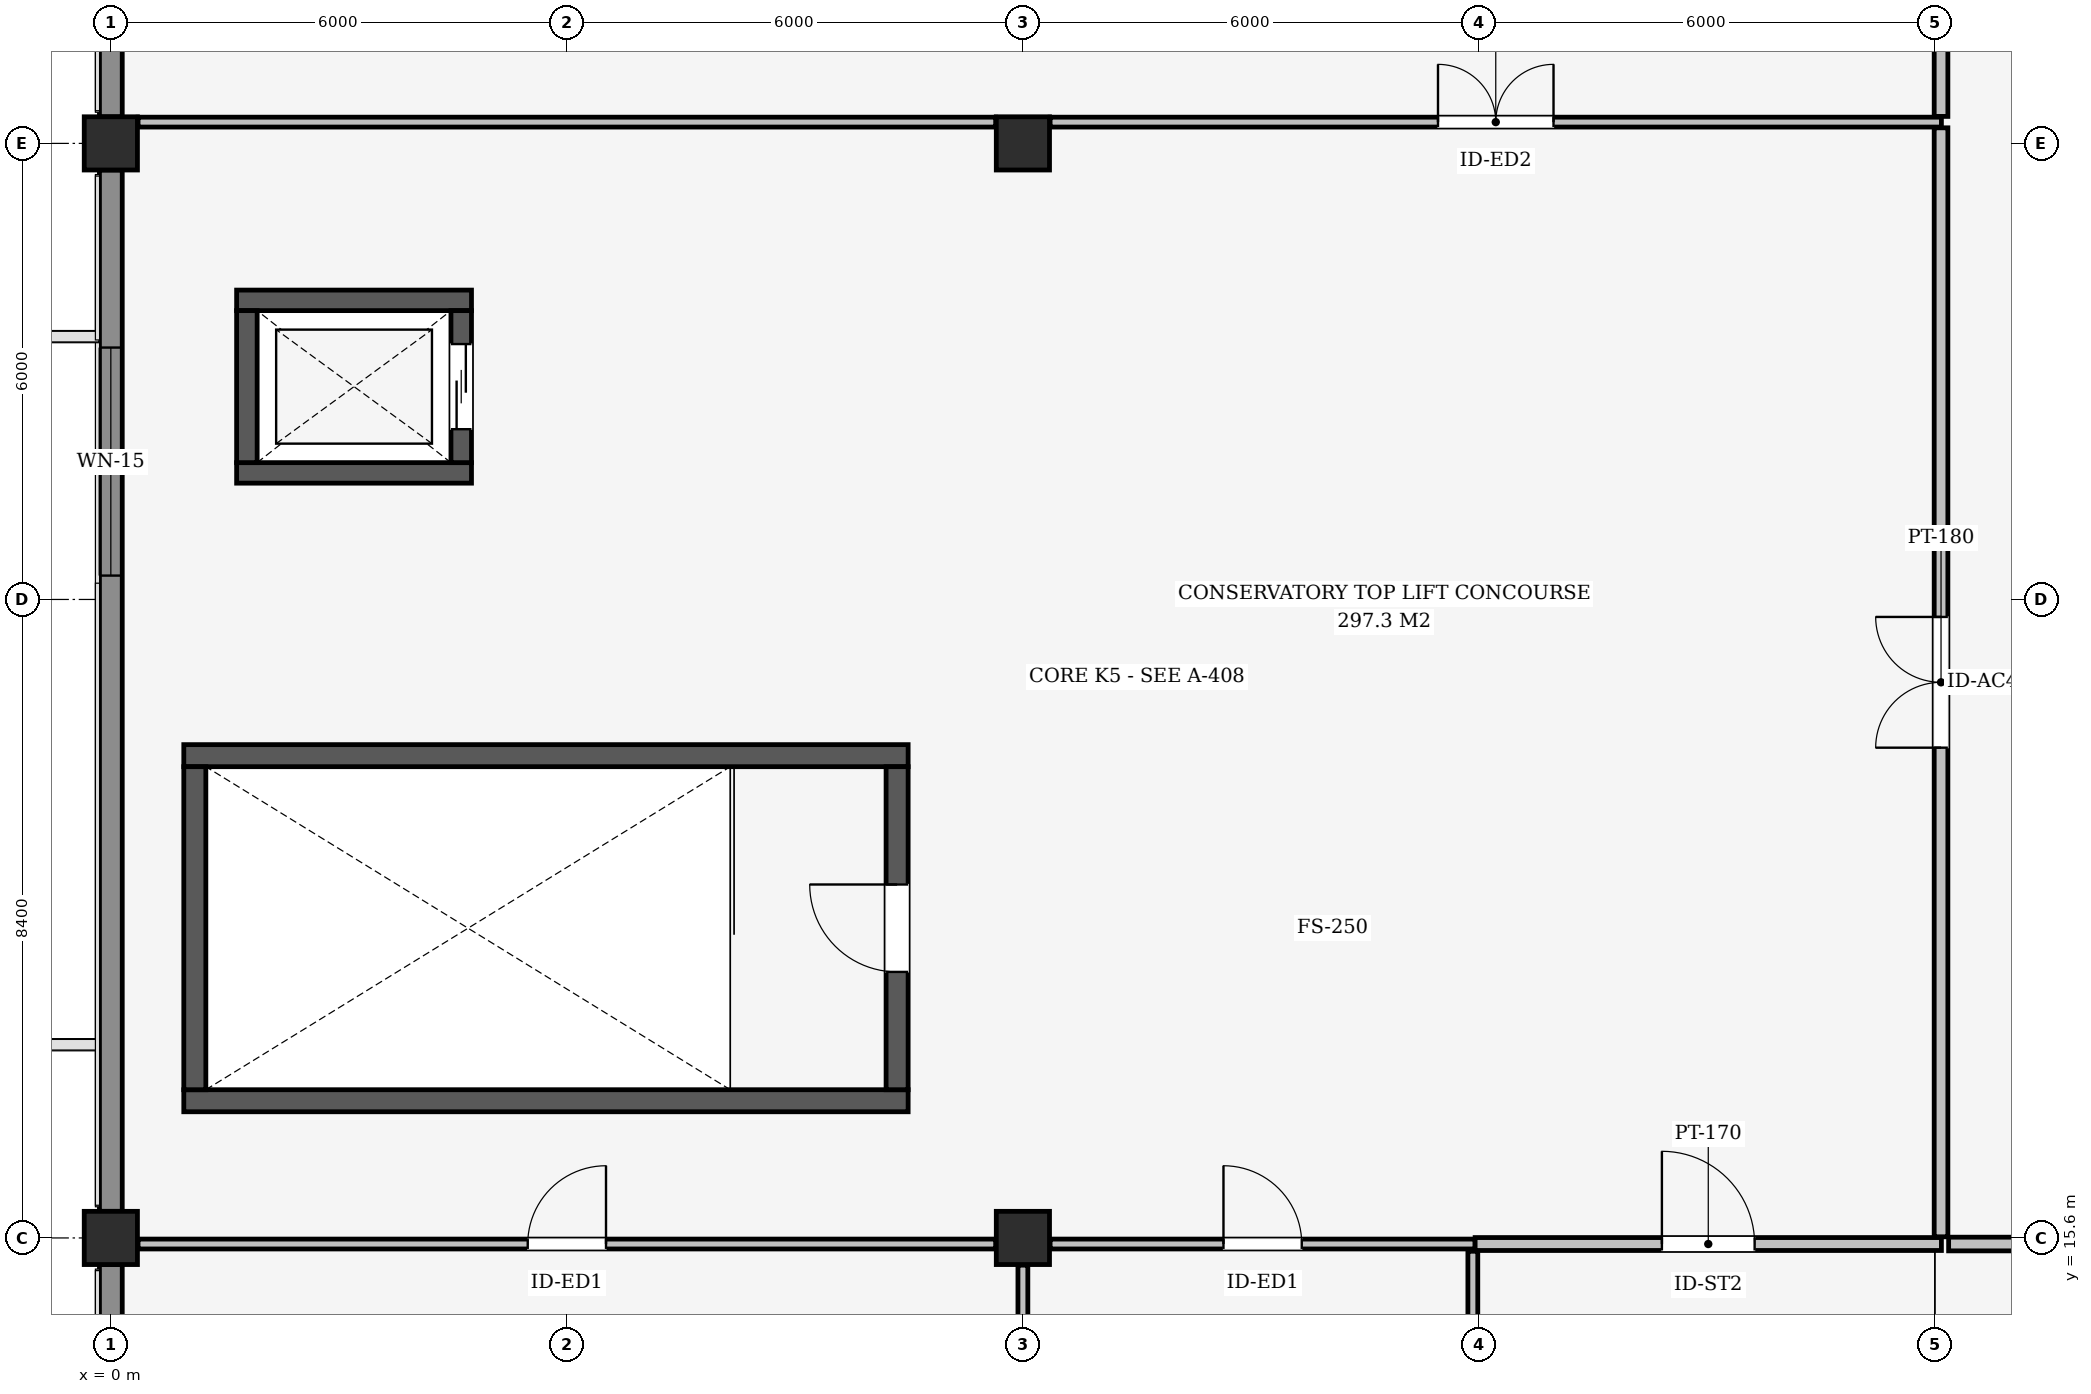
"""IFC4 building model, lengths in metres.
Left out: names, types, materials, properties, quantities, classifications, styles, units other than length and angle.
Written with IfcOpenShell. Run it as: python <this file> out.ifc"""

import sys

from ifc_helpers import new_model, si_unit, direction, frame, frame_2d, origin, origin_2d, place, context, subcontext, project, spatial, rectangle, extrude, element, fill, save


model = new_model("IFC4")
c1 = context("Model", 3, precision=1e-05, world=origin(), true_north=direction((0.0, 1.0)))
c2 = subcontext(c1, "Body", "Model", "MODEL_VIEW")
j1 = project(units=[si_unit("LENGTHUNIT", "METRE"), si_unit("PLANEANGLEUNIT", "RADIAN")], contexts=[c1])
p1 = place(None, origin())
s1 = spatial("IfcSite", under=j1, at=p1, CompositionType="ELEMENT")
p2 = place(p1, origin())
s2 = spatial("IfcBuilding", under=s1, at=p2, CompositionType="ELEMENT")
p3 = place(p2, frame((0.0, 0.0, 9.3)))
s3 = spatial("IfcBuildingStorey", under=s2, at=p3, CompositionType="ELEMENT", Elevation=9.3)
for number, where, z_axis, x_axis in (
    (1, (0.0, 15.6, 0.0), (0.0, 0.0, 1.0), (1.0, 0.0, 0.0)),
    (2, (0.0, 30.0, 0.0), (0.0, 0.0, 1.0), (1.0, 0.0, 0.0)),
    (3, (12.0, 15.6, 0.0), (0.0, 0.0, 1.0), (1.0, 0.0, 0.0)),
    (4, (12.0, 30.0, 0.0), (0.0, 0.0, 1.0), (1.0, 0.0, 0.0)),
):
    element("IfcColumn", number, at=place(p3, frame(where, z_axis=z_axis, x_axis=x_axis)), inside=s3, PredefinedType="COLUMN", context=c2, shape_type="SweptSolid", body=[
        extrude(rectangle(XDim=0.7, YDim=0.7, at=origin_2d()), origin(), (0.0, 0.0, 1.0), 4.5),
    ])
p4 = place(p3, frame((0.0, 0.4, 0.0), z_axis=(0.0, 0.0, 1.0), x_axis=(0.0, 1.0, 0.0)))
e5 = element("IfcWall", 5, at=p4, inside=s3, PredefinedType="SOLIDWALL", context=c2, shape_type="SweptSolid", body=[
    extrude(rectangle(XDim=14.85, YDim=0.3, at=frame_2d((7.425, 0.0))), origin(), (0.0, 0.0, 1.0), 3.634),
])
p5 = place(p4, frame((7.0, 0.0, 0.6)))
e6 = element("IfcOpeningElement", 6, at=p5, cuts=e5, PredefinedType="OPENING", context=c2, shape_type="SweptSolid", body=[
    extrude(rectangle(XDim=0.85, YDim=2.35, at=frame_2d((0.425, 1.175))), frame((0.0, 0.16, 0.0), z_axis=(0.0, -1.0, 0.0), x_axis=(1.0, 0.0, 0.0)), (0.0, 0.0, 1.0), 0.32),
])
p6 = place(p3, frame((0.0, 15.95, 0.0), z_axis=(0.0, 0.0, 1.0), x_axis=(0.0, 1.0, 0.0)))
e7 = element("IfcWall", 7, at=p6, inside=s3, PredefinedType="SOLIDWALL", context=c2, shape_type="SweptSolid", body=[
    extrude(rectangle(XDim=13.7, YDim=0.3, at=frame_2d((6.85, 0.0))), origin(), (0.0, 0.0, 1.0), 3.869),
])
p7 = place(p6, frame((8.364, 0.0, 0.6)))
e8 = element("IfcOpeningElement", 8, at=p7, cuts=e7, PredefinedType="OPENING", context=c2, shape_type="SweptSolid", body=[
    extrude(rectangle(XDim=3.0, YDim=2.1, at=frame_2d((1.5, 1.05))), frame((0.0, 0.16, 0.0), z_axis=(0.0, -1.0, 0.0), x_axis=(1.0, 0.0, 0.0)), (0.0, 0.0, 1.0), 0.32),
])
p8 = place(p3, frame((0.0, 30.35, 0.0), z_axis=(0.0, 0.0, 1.0), x_axis=(0.0, 1.0, 0.0)))
e9 = element("IfcWall", 9, at=p8, inside=s3, PredefinedType="SOLIDWALL", context=c2, shape_type="SweptSolid", body=[
    extrude(rectangle(XDim=8.25, YDim=0.3, at=frame_2d((4.125, 0.0))), origin(), (0.0, 0.0, 1.0), 3.869),
])
p9 = place(p8, frame((1.31, 0.0, 0.85)))
e10 = element("IfcOpeningElement", 10, at=p9, cuts=e9, PredefinedType="OPENING", context=c2, shape_type="SweptSolid", body=[
    extrude(rectangle(XDim=2.0, YDim=1.85, at=frame_2d((1.0, 0.925))), frame((0.0, 0.16, 0.0), z_axis=(0.0, -1.0, 0.0), x_axis=(1.0, 0.0, 0.0)), (0.0, 0.0, 1.0), 0.32),
])
for number, where, z_axis, x_axis in (
    (11, (0.96, 17.405, 0.0), (0.0, 0.0, 1.0), (1.0, 0.0, 0.0)),
    (12, (0.96, 21.945, 0.0), (0.0, 0.0, 1.0), (1.0, 0.0, 0.0)),
):
    element("IfcWall", number, at=place(p3, frame(where, z_axis=z_axis, x_axis=x_axis)), inside=s3, PredefinedType="SHEAR", context=c2, shape_type="SweptSolid", body=[
        extrude(rectangle(XDim=9.53, YDim=0.29, at=frame_2d((4.765, 0.0))), origin(), (0.0, 0.0, 1.0), 4.5),
    ])
p10 = place(p3, frame((1.105, 17.55, 0.0), z_axis=(0.0, 0.0, 1.0), x_axis=(0.0, 1.0, 0.0)))
e13 = element("IfcWall", 13, at=p10, inside=s3, PredefinedType="SHEAR", context=c2, shape_type="SweptSolid", body=[
    extrude(rectangle(XDim=4.25, YDim=0.29, at=frame_2d((2.125, 0.0))), origin(), (0.0, 0.0, 1.0), 4.5),
])
p11 = place(p3, frame((10.345, 17.55, 0.0), z_axis=(0.0, 0.0, 1.0), x_axis=(0.0, 1.0, 0.0)))
e14 = element("IfcWall", 14, at=p11, inside=s3, PredefinedType="SHEAR", context=c2, shape_type="SweptSolid", body=[
    extrude(rectangle(XDim=4.25, YDim=0.29, at=frame_2d((2.125, 0.0))), origin(), (0.0, 0.0, 1.0), 4.5),
])
p12 = place(p11, frame((1.55, 0.0, 0.0)))
e15 = element("IfcOpeningElement", 15, at=p12, cuts=e14, PredefinedType="OPENING", context=c2, shape_type="SweptSolid", body=[
    extrude(rectangle(XDim=1.15, YDim=2.15, at=frame_2d((0.575, 1.075))), frame((0.0, 0.155, 0.0), z_axis=(0.0, -1.0, 0.0), x_axis=(1.0, 0.0, 0.0)), (0.0, 0.0, 1.0), 0.31),
])
for number, where, z_axis, x_axis in (
    (16, (1.655, 25.665, 0.0), (0.0, 0.0, 1.0), (1.0, 0.0, 0.0)),
    (17, (1.655, 27.935, 0.0), (0.0, 0.0, 1.0), (1.0, 0.0, 0.0)),
):
    element("IfcWall", number, at=place(p3, frame(where, z_axis=z_axis, x_axis=x_axis)), inside=s3, PredefinedType="SHEAR", context=c2, shape_type="SweptSolid", body=[
        extrude(rectangle(XDim=3.09, YDim=0.27, at=frame_2d((1.545, 0.0))), origin(), (0.0, 0.0, 1.0), 4.5),
    ])
p13 = place(p3, frame((1.79, 25.8, 0.0), z_axis=(0.0, 0.0, 1.0), x_axis=(0.0, 1.0, 0.0)))
e18 = element("IfcWall", 18, at=p13, inside=s3, PredefinedType="SHEAR", context=c2, shape_type="SweptSolid", body=[
    extrude(rectangle(XDim=2.0, YDim=0.27, at=frame_2d((1.0, 0.0))), origin(), (0.0, 0.0, 1.0), 4.5),
])
p14 = place(p3, frame((4.61, 25.8, 0.0), z_axis=(0.0, 0.0, 1.0), x_axis=(0.0, 1.0, 0.0)))
e19 = element("IfcWall", 19, at=p14, inside=s3, PredefinedType="SHEAR", context=c2, shape_type="SweptSolid", body=[
    extrude(rectangle(XDim=2.0, YDim=0.27, at=frame_2d((1.0, 0.0))), origin(), (0.0, 0.0, 1.0), 4.5),
])
p15 = place(p14, frame((0.44, 0.0, 0.0)))
e20 = element("IfcOpeningElement", 20, at=p15, cuts=e19, PredefinedType="OPENING", context=c2, shape_type="SweptSolid", body=[
    extrude(rectangle(XDim=1.12, YDim=2.15, at=frame_2d((0.56, 1.075))), frame((0.0, 0.145, 0.0), z_axis=(0.0, -1.0, 0.0), x_axis=(1.0, 0.0, 0.0)), (0.0, 0.0, 1.0), 0.29),
])
p16 = place(p3, frame((0.358, 15.52, 0.0), z_axis=(0.0, 0.0, 1.0), x_axis=(1.0, 0.0, 0.0)))
e21 = element("IfcWall", 21, at=p16, inside=s3, PredefinedType="PARTITIONING", context=c2, shape_type="SweptSolid", body=[
    extrude(rectangle(XDim=11.284, YDim=0.13, at=frame_2d((5.642, 0.0))), origin(), (0.0, 0.0, 1.0), 3.873),
])
p17 = place(p16, frame((5.127, 0.0, 0.0)))
e22 = element("IfcOpeningElement", 22, at=p17, cuts=e21, PredefinedType="OPENING", context=c2, shape_type="SweptSolid", body=[
    extrude(rectangle(XDim=1.03, YDim=2.18, at=frame_2d((0.515, 1.09))), frame((0.0, 0.075, 0.0), z_axis=(0.0, -1.0, 0.0), x_axis=(1.0, 0.0, 0.0)), (0.0, 0.0, 1.0), 0.15),
])
p18 = place(p3, frame((12.358, 15.52, 0.0), z_axis=(0.0, 0.0, 1.0), x_axis=(1.0, 0.0, 0.0)))
e23 = element("IfcWall", 23, at=p18, inside=s3, PredefinedType="PARTITIONING", context=c2, shape_type="SweptSolid", body=[
    extrude(rectangle(XDim=5.592, YDim=0.13, at=frame_2d((2.796, 0.0))), origin(), (0.0, 0.0, 1.0), 3.18),
])
p19 = place(p18, frame((2.281, 0.0, 0.0)))
e24 = element("IfcOpeningElement", 24, at=p19, cuts=e23, PredefinedType="OPENING", context=c2, shape_type="SweptSolid", body=[
    extrude(rectangle(XDim=1.03, YDim=2.18, at=frame_2d((0.515, 1.09))), frame((0.0, 0.075, 0.0), z_axis=(0.0, -1.0, 0.0), x_axis=(1.0, 0.0, 0.0)), (0.0, 0.0, 1.0), 0.15),
])
p20 = place(p3, frame((0.358, 30.28, 0.0), z_axis=(0.0, 0.0, 1.0), x_axis=(1.0, 0.0, 0.0)))
e25 = element("IfcWall", 25, at=p20, inside=s3, PredefinedType="PARTITIONING", context=c2, shape_type="SweptSolid", body=[
    extrude(rectangle(XDim=11.284, YDim=0.13, at=frame_2d((5.642, 0.0))), origin(), (0.0, 0.0, 1.0), 3.873),
])
p21 = place(p3, frame((12.358, 30.28, 0.0), z_axis=(0.0, 0.0, 1.0), x_axis=(1.0, 0.0, 0.0)))
e26 = element("IfcWall", 26, at=p21, inside=s3, PredefinedType="PARTITIONING", context=c2, shape_type="SweptSolid", body=[
    extrude(rectangle(XDim=11.727, YDim=0.13, at=frame_2d((5.864, 0.0))), origin(), (0.0, 0.0, 1.0), 3.18),
])
p22 = place(p21, frame((5.104, 0.0, 0.0)))
e27 = element("IfcOpeningElement", 27, at=p22, cuts=e26, PredefinedType="OPENING", context=c2, shape_type="SweptSolid", body=[
    extrude(rectangle(XDim=1.52, YDim=2.24, at=frame_2d((0.76, 1.12))), frame((0.0, 0.075, 0.0), z_axis=(0.0, -1.0, 0.0), x_axis=(1.0, 0.0, 0.0)), (0.0, 0.0, 1.0), 0.15),
])
p23 = place(p3, frame((17.95, 15.52, 0.0), z_axis=(0.0, 0.0, 1.0), x_axis=(1.0, 0.0, 0.0)))
e28 = element("IfcWall", 28, at=p23, inside=s3, PredefinedType="PARTITIONING", context=c2, shape_type="SweptSolid", body=[
    extrude(rectangle(XDim=6.135, YDim=0.17, at=frame_2d((3.067, 0.0))), origin(), (0.0, 0.0, 1.0), 3.18),
])
p24 = place(p23, frame((2.458, 0.0, 0.0)))
e29 = element("IfcOpeningElement", 29, at=p24, cuts=e28, PredefinedType="OPENING", context=c2, shape_type="SweptSolid", body=[
    extrude(rectangle(XDim=1.22, YDim=2.18, at=frame_2d((0.61, 1.09))), frame((0.0, 0.095, 0.0), z_axis=(0.0, -1.0, 0.0), x_axis=(1.0, 0.0, 0.0)), (0.0, 0.0, 1.0), 0.19),
])
p25 = place(p3, frame((24.08, 15.615, 0.0), z_axis=(0.0, 0.0, 1.0), x_axis=(0.0, 1.0, 0.0)))
e30 = element("IfcWall", 30, at=p25, inside=s3, PredefinedType="PARTITIONING", context=c2, shape_type="SweptSolid", body=[
    extrude(rectangle(XDim=14.59, YDim=0.18, at=frame_2d((7.295, 0.0))), origin(), (0.0, 0.0, 1.0), 3.944),
])
p26 = place(p25, frame((6.435, 0.0, 0.0)))
e31 = element("IfcOpeningElement", 31, at=p26, cuts=e30, PredefinedType="OPENING", context=c2, shape_type="SweptSolid", body=[
    extrude(rectangle(XDim=1.72, YDim=2.34, at=frame_2d((0.86, 1.17))), frame((0.0, 0.1, 0.0), z_axis=(0.0, -1.0, 0.0), x_axis=(1.0, 0.0, 0.0)), (0.0, 0.0, 1.0), 0.2),
])
p27 = place(p3, frame((12.0, 0.408, 0.0), z_axis=(0.0, 0.0, 1.0), x_axis=(0.0, 1.0, 0.0)))
e32 = element("IfcWall", 32, at=p27, inside=s3, PredefinedType="PARTITIONING", context=c2, shape_type="SweptSolid", body=[
    extrude(rectangle(XDim=14.834, YDim=0.13, at=frame_2d((7.417, 0.0))), origin(), (0.0, 0.0, 1.0), 3.634),
])
p28 = place(p3, frame((17.92, 0.16, 0.0), z_axis=(0.0, 0.0, 1.0), x_axis=(0.0, 1.0, 0.0)))
e33 = element("IfcWall", 33, at=p28, inside=s3, PredefinedType="PARTITIONING", context=c2, shape_type="SweptSolid", body=[
    extrude(rectangle(XDim=15.265, YDim=0.13, at=frame_2d((7.633, 0.0))), origin(), (0.0, 0.0, 1.0), 4.5),
])
p29 = place(p28, frame((7.117, 0.0, 0.0)))
e34 = element("IfcOpeningElement", 34, at=p29, cuts=e33, PredefinedType="OPENING", context=c2, shape_type="SweptSolid", body=[
    extrude(rectangle(XDim=1.03, YDim=2.18, at=frame_2d((0.515, 1.09))), frame((0.0, 0.075, 0.0), z_axis=(0.0, -1.0, 0.0), x_axis=(1.0, 0.0, 0.0)), (0.0, 0.0, 1.0), 0.15),
])
p30 = place(p3, frame((24.08, 30.355, 0.0), z_axis=(0.0, 0.0, 1.0), x_axis=(0.0, 1.0, 0.0)))
e35 = element("IfcWall", 35, at=p30, inside=s3, PredefinedType="PARTITIONING", context=c2, shape_type="SweptSolid", body=[
    extrude(rectangle(XDim=8.237, YDim=0.18, at=frame_2d((4.119, 0.0))), origin(), (0.0, 0.0, 1.0), 3.944),
])
p31 = place(p3, frame((24.18, 15.52, 0.0), z_axis=(0.0, 0.0, 1.0), x_axis=(1.0, 0.0, 0.0)))
e36 = element("IfcWall", 36, at=p31, inside=s3, PredefinedType="PARTITIONING", context=c2, shape_type="SweptSolid", body=[
    extrude(rectangle(XDim=11.462, YDim=0.18, at=frame_2d((5.731, 0.0))), origin(), (0.0, 0.0, 1.0), 3.18),
])
p32 = place(p31, frame((4.871, 0.0, 0.0)))
e37 = element("IfcOpeningElement", 37, at=p32, cuts=e36, PredefinedType="OPENING", context=c2, shape_type="SweptSolid", body=[
    extrude(rectangle(XDim=1.72, YDim=2.34, at=frame_2d((0.86, 1.17))), frame((0.0, 0.1, 0.0), z_axis=(0.0, -1.0, 0.0), x_axis=(1.0, 0.0, 0.0)), (0.0, 0.0, 1.0), 0.2),
])
p33 = place(p7, origin())
e38 = element("IfcWindow", 38, at=p33, inside=s3, PartitioningType="SINGLE_PANEL", PredefinedType="WINDOW", context=c2, shape_type="SweptSolid", body=[
    extrude(rectangle(XDim=3.0, YDim=2.1, at=frame_2d((1.5, 1.05))), frame((0.0, 0.03, 0.0), z_axis=(0.0, -1.0, 0.0), x_axis=(1.0, 0.0, 0.0)), (0.0, 0.0, 1.0), 0.06),
])
fill(e8, e38)
p34 = place(p12, origin())
e39 = element("IfcDoor", 39, at=p34, inside=s3, OperationType="SINGLE_SWING_RIGHT", PredefinedType="DOOR", context=c2, shape_type="SweptSolid", body=[
    extrude(rectangle(XDim=1.15, YDim=2.15, at=frame_2d((0.575, 1.075))), frame((0.0, 0.025, 0.0), z_axis=(0.0, -1.0, 0.0), x_axis=(1.0, 0.0, 0.0)), (0.0, 0.0, 1.0), 0.05),
])
fill(e15, e39)
p35 = place(p15, origin())
e40 = element("IfcDoor", 40, at=p35, inside=s3, OperationType="SLIDING_TO_LEFT", PredefinedType="DOOR", context=c2, shape_type="SweptSolid", body=[
    extrude(rectangle(XDim=1.12, YDim=2.15, at=frame_2d((0.56, 1.075))), frame((0.0, 0.025, 0.0), z_axis=(0.0, -1.0, 0.0), x_axis=(1.0, 0.0, 0.0)), (0.0, 0.0, 1.0), 0.05),
])
fill(e20, e40)
p36 = place(p17, origin())
e41 = element("IfcDoor", 41, at=p36, inside=s3, OperationType="SINGLE_SWING_RIGHT", PredefinedType="DOOR", context=c2, shape_type="SweptSolid", body=[
    extrude(rectangle(XDim=1.03, YDim=2.18, at=frame_2d((0.515, 1.09))), frame((0.0, 0.025, 0.0), z_axis=(0.0, -1.0, 0.0), x_axis=(1.0, 0.0, 0.0)), (0.0, 0.0, 1.0), 0.05),
])
fill(e22, e41)
p37 = place(p19, origin())
e42 = element("IfcDoor", 42, at=p37, inside=s3, OperationType="SINGLE_SWING_LEFT", PredefinedType="DOOR", context=c2, shape_type="SweptSolid", body=[
    extrude(rectangle(XDim=1.03, YDim=2.18, at=frame_2d((0.515, 1.09))), frame((0.0, 0.025, 0.0), z_axis=(0.0, -1.0, 0.0), x_axis=(1.0, 0.0, 0.0)), (0.0, 0.0, 1.0), 0.05),
])
fill(e24, e42)
p38 = place(p22, origin())
e43 = element("IfcDoor", 43, at=p38, inside=s3, OperationType="DOUBLE_DOOR_SINGLE_SWING", PredefinedType="DOOR", context=c2, shape_type="SweptSolid", body=[
    extrude(rectangle(XDim=1.52, YDim=2.24, at=frame_2d((0.76, 1.12))), frame((0.0, 0.025, 0.0), z_axis=(0.0, -1.0, 0.0), x_axis=(1.0, 0.0, 0.0)), (0.0, 0.0, 1.0), 0.05),
])
fill(e27, e43)
p39 = place(p24, origin())
e44 = element("IfcDoor", 44, at=p39, inside=s3, OperationType="SINGLE_SWING_LEFT", PredefinedType="DOOR", context=c2, shape_type="SweptSolid", body=[
    extrude(rectangle(XDim=1.22, YDim=2.18, at=frame_2d((0.61, 1.09))), frame((0.0, 0.025, 0.0), z_axis=(0.0, -1.0, 0.0), x_axis=(1.0, 0.0, 0.0)), (0.0, 0.0, 1.0), 0.05),
])
fill(e29, e44)
p40 = place(p26, origin())
e45 = element("IfcDoor", 45, at=p40, inside=s3, OperationType="DOUBLE_DOOR_SINGLE_SWING", PredefinedType="DOOR", context=c2, shape_type="SweptSolid", body=[
    extrude(rectangle(XDim=1.72, YDim=2.34, at=frame_2d((0.86, 1.17))), frame((0.0, 0.025, 0.0), z_axis=(0.0, -1.0, 0.0), x_axis=(1.0, 0.0, 0.0)), (0.0, 0.0, 1.0), 0.05),
])
fill(e31, e45)
save(model, sys.argv[1])
